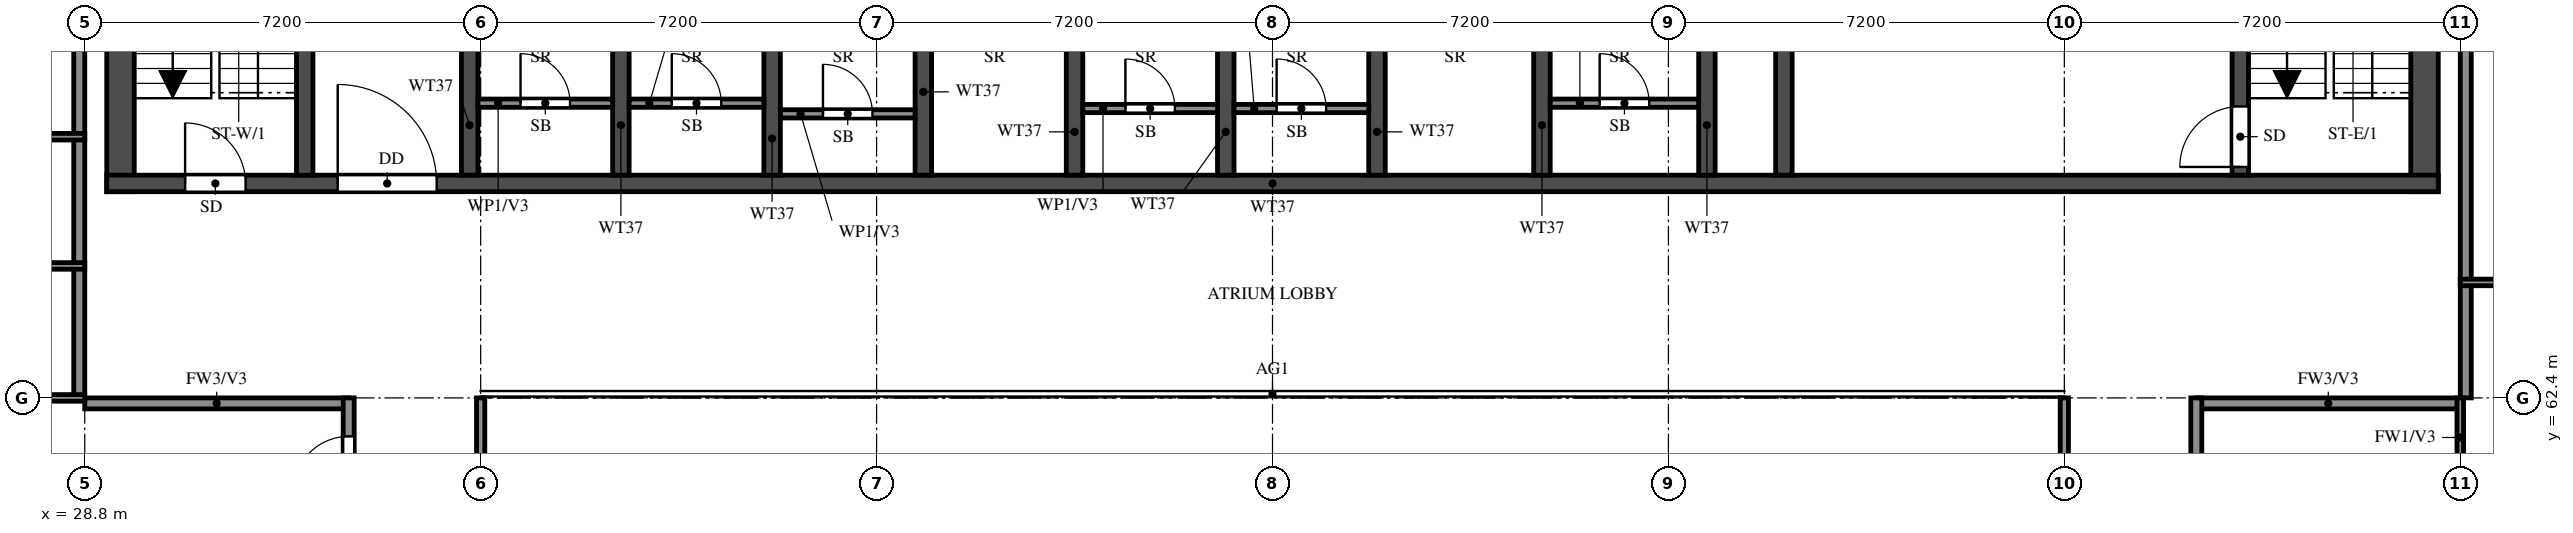
"""IFC4 building model, lengths in metres.
Left out: names, types, materials, properties, quantities, classifications, styles, units other than length and angle.
Written with IfcOpenShell. Run it as: python <this file> out.ifc"""

import sys

from ifc_helpers import new_model, si_unit, direction, frame, frame_2d, origin, place, context, subcontext, project, spatial, rectangle, extrude, element, fill, save


model = new_model("IFC4")
c1 = context("Model", 3, precision=1e-05, world=origin(), true_north=direction((0.0, 1.0)))
c2 = subcontext(c1, "Body", "Model", "MODEL_VIEW")
j1 = project(units=[si_unit("LENGTHUNIT", "METRE"), si_unit("PLANEANGLEUNIT", "RADIAN")], contexts=[c1])
p1 = place(None, origin())
s1 = spatial("IfcSite", under=j1, at=p1, CompositionType="ELEMENT")
p2 = place(p1, origin())
s2 = spatial("IfcBuilding", under=s1, at=p2, CompositionType="ELEMENT")
p3 = place(p2, frame((0.0, 0.0, 246.5)))
s3 = spatial("IfcBuildingStorey", under=s2, at=p3, CompositionType="ELEMENT", Elevation=246.5)
for number, where, z_axis, x_axis in (
    (1, (29.45, 66.15, 0.0), (0.0, 0.0, 1.0), (0.0, 1.0, 0.0)),
    (2, (71.35, 66.15, 0.0), (0.0, 0.0, 1.0), (0.0, 1.0, 0.0)),
):
    element("IfcWall", number, at=place(p3, frame(where, z_axis=z_axis, x_axis=x_axis)), inside=s3, PredefinedType="SHEAR", context=c2, shape_type="SweptSolid", body=[
        extrude(rectangle(XDim=11.85, YDim=0.5, at=frame_2d((5.925, 0.0))), origin(), (0.0, 0.0, 1.0), 3.22),
    ])
p4 = place(p3, frame((29.2, 66.3, 0.0), z_axis=(0.0, 0.0, 1.0), x_axis=(1.0, 0.0, 0.0)))
e3 = element("IfcWall", 3, at=p4, inside=s3, PredefinedType="SHEAR", context=c2, shape_type="SweptSolid", body=[
    extrude(rectangle(XDim=42.4, YDim=0.3, at=frame_2d((21.2, 0.0))), origin(), (0.0, 0.0, 1.0), 3.22),
])
p5 = place(p4, frame((1.425, 0.0, 0.0)))
e4 = element("IfcOpeningElement", 4, at=p5, cuts=e3, PredefinedType="OPENING", context=c2, shape_type="SweptSolid", body=[
    extrude(rectangle(XDim=1.1, YDim=2.1, at=frame_2d((0.55, 1.05))), frame((0.0, 0.16, 0.0), z_axis=(0.0, -1.0, 0.0), x_axis=(1.0, 0.0, 0.0)), (0.0, 0.0, 1.0), 0.32),
])
p6 = place(p4, frame((4.2, 0.0, 0.0)))
e5 = element("IfcOpeningElement", 5, at=p6, cuts=e3, PredefinedType="OPENING", context=c2, shape_type="SweptSolid", body=[
    extrude(rectangle(XDim=1.8, YDim=2.1, at=frame_2d((0.9, 1.05))), frame((0.0, 0.16, 0.0), z_axis=(0.0, -1.0, 0.0), x_axis=(1.0, 0.0, 0.0)), (0.0, 0.0, 1.0), 0.32),
])
p7 = place(p3, frame((32.8, 66.45, 0.0), z_axis=(0.0, 0.0, 1.0), x_axis=(0.0, 1.0, 0.0)))
e6 = element("IfcWall", 6, at=p7, inside=s3, PredefinedType="SHEAR", context=c2, shape_type="SweptSolid", body=[
    extrude(rectangle(XDim=11.05, YDim=0.3, at=frame_2d((5.525, 0.0))), origin(), (0.0, 0.0, 1.0), 3.22),
])
p8 = place(p3, frame((68.0, 66.45, 0.0), z_axis=(0.0, 0.0, 1.0), x_axis=(0.0, 1.0, 0.0)))
e7 = element("IfcWall", 7, at=p8, inside=s3, PredefinedType="SHEAR", context=c2, shape_type="SweptSolid", body=[
    extrude(rectangle(XDim=11.05, YDim=0.3, at=frame_2d((5.525, 0.0))), origin(), (0.0, 0.0, 1.0), 3.22),
])
p9 = place(p8, frame((0.15, 0.0, 0.0)))
e8 = element("IfcOpeningElement", 8, at=p9, cuts=e7, PredefinedType="OPENING", context=c2, shape_type="SweptSolid", body=[
    extrude(rectangle(XDim=1.1, YDim=2.1, at=frame_2d((0.55, 1.05))), frame((0.0, 0.16, 0.0), z_axis=(0.0, -1.0, 0.0), x_axis=(1.0, 0.0, 0.0)), (0.0, 0.0, 1.0), 0.32),
])
p10 = place(p3, frame((59.7, 66.45, 0.0), z_axis=(0.0, 0.0, 1.0), x_axis=(0.0, 1.0, 0.0)))
e9 = element("IfcWall", 9, at=p10, inside=s3, PredefinedType="SHEAR", context=c2, shape_type="SweptSolid", body=[
    extrude(rectangle(XDim=6.175, YDim=0.3, at=frame_2d((3.087, 0.0))), origin(), (0.0, 0.0, 1.0), 3.22),
])
p11 = place(p10, frame((3.85, 0.0, 0.0)))
e10 = element("IfcOpeningElement", 10, at=p11, cuts=e9, PredefinedType="OPENING", context=c2, shape_type="SweptSolid", body=[
    extrude(rectangle(XDim=1.2, YDim=2.1, at=frame_2d((0.6, 1.05))), frame((0.0, 0.16, 0.0), z_axis=(0.0, -1.0, 0.0), x_axis=(1.0, 0.0, 0.0)), (0.0, 0.0, 1.0), 0.32),
])
for number, where, z_axis, x_axis in (
    (11, (35.8, 66.45, 0.0), (0.0, 0.0, 1.0), (0.0, 1.0, 0.0)),
    (12, (38.55, 66.45, 0.0), (0.0, 0.0, 1.0), (0.0, 1.0, 0.0)),
    (13, (41.3, 66.45, 0.0), (0.0, 0.0, 1.0), (0.0, 1.0, 0.0)),
    (14, (44.05, 66.45, 0.0), (0.0, 0.0, 1.0), (0.0, 1.0, 0.0)),
    (15, (46.8, 66.45, 0.0), (0.0, 0.0, 1.0), (0.0, 1.0, 0.0)),
    (16, (49.55, 66.45, 0.0), (0.0, 0.0, 1.0), (0.0, 1.0, 0.0)),
    (17, (52.3, 66.45, 0.0), (0.0, 0.0, 1.0), (0.0, 1.0, 0.0)),
    (18, (55.3, 66.45, 0.0), (0.0, 0.0, 1.0), (0.0, 1.0, 0.0)),
    (19, (58.3, 66.45, 0.0), (0.0, 0.0, 1.0), (0.0, 1.0, 0.0)),
):
    element("IfcWall", number, at=place(p3, frame(where, z_axis=z_axis, x_axis=x_axis)), inside=s3, PredefinedType="SHEAR", context=c2, shape_type="SweptSolid", body=[
        extrude(rectangle(XDim=2.425, YDim=0.3, at=frame_2d((1.212, 0.0))), origin(), (0.0, 0.0, 1.0), 3.22),
    ])
p12 = place(p3, frame((35.95, 67.76, 0.0), z_axis=(0.0, 0.0, 1.0), x_axis=(1.0, 0.0, 0.0)))
e20 = element("IfcWall", 20, at=p12, inside=s3, PredefinedType="PARTITIONING", context=c2, shape_type="SweptSolid", body=[
    extrude(rectangle(XDim=2.45, YDim=0.15, at=frame_2d((1.225, 0.0))), origin(), (0.0, 0.0, 1.0), 3.22),
])
p13 = place(p12, frame((0.775, 0.0, 0.0)))
e21 = element("IfcOpeningElement", 21, at=p13, cuts=e20, PredefinedType="OPENING", context=c2, shape_type="SweptSolid", body=[
    extrude(rectangle(XDim=0.9, YDim=2.1, at=frame_2d((0.45, 1.05))), frame((0.0, 0.085, 0.0), z_axis=(0.0, -1.0, 0.0), x_axis=(1.0, 0.0, 0.0)), (0.0, 0.0, 1.0), 0.17),
])
p14 = place(p3, frame((38.7, 67.76, 0.0), z_axis=(0.0, 0.0, 1.0), x_axis=(1.0, 0.0, 0.0)))
e22 = element("IfcWall", 22, at=p14, inside=s3, PredefinedType="PARTITIONING", context=c2, shape_type="SweptSolid", body=[
    extrude(rectangle(XDim=2.45, YDim=0.15, at=frame_2d((1.225, 0.0))), origin(), (0.0, 0.0, 1.0), 3.22),
])
p15 = place(p14, frame((0.775, 0.0, 0.0)))
e23 = element("IfcOpeningElement", 23, at=p15, cuts=e22, PredefinedType="OPENING", context=c2, shape_type="SweptSolid", body=[
    extrude(rectangle(XDim=0.9, YDim=2.1, at=frame_2d((0.45, 1.05))), frame((0.0, 0.085, 0.0), z_axis=(0.0, -1.0, 0.0), x_axis=(1.0, 0.0, 0.0)), (0.0, 0.0, 1.0), 0.17),
])
p16 = place(p3, frame((41.45, 67.565, 0.0), z_axis=(0.0, 0.0, 1.0), x_axis=(1.0, 0.0, 0.0)))
e24 = element("IfcWall", 24, at=p16, inside=s3, PredefinedType="PARTITIONING", context=c2, shape_type="SweptSolid", body=[
    extrude(rectangle(XDim=2.45, YDim=0.15, at=frame_2d((1.225, 0.0))), origin(), (0.0, 0.0, 1.0), 3.22),
])
p17 = place(p16, frame((0.775, 0.0, 0.0)))
e25 = element("IfcOpeningElement", 25, at=p17, cuts=e24, PredefinedType="OPENING", context=c2, shape_type="SweptSolid", body=[
    extrude(rectangle(XDim=0.9, YDim=2.1, at=frame_2d((0.45, 1.05))), frame((0.0, 0.085, 0.0), z_axis=(0.0, -1.0, 0.0), x_axis=(1.0, 0.0, 0.0)), (0.0, 0.0, 1.0), 0.17),
])
p18 = place(p3, frame((46.95, 67.663, 0.0), z_axis=(0.0, 0.0, 1.0), x_axis=(1.0, 0.0, 0.0)))
e26 = element("IfcWall", 26, at=p18, inside=s3, PredefinedType="PARTITIONING", context=c2, shape_type="SweptSolid", body=[
    extrude(rectangle(XDim=2.45, YDim=0.15, at=frame_2d((1.225, 0.0))), origin(), (0.0, 0.0, 1.0), 3.22),
])
p19 = place(p18, frame((0.775, 0.0, 0.0)))
e27 = element("IfcOpeningElement", 27, at=p19, cuts=e26, PredefinedType="OPENING", context=c2, shape_type="SweptSolid", body=[
    extrude(rectangle(XDim=0.9, YDim=2.1, at=frame_2d((0.45, 1.05))), frame((0.0, 0.085, 0.0), z_axis=(0.0, -1.0, 0.0), x_axis=(1.0, 0.0, 0.0)), (0.0, 0.0, 1.0), 0.17),
])
p20 = place(p3, frame((49.7, 67.663, 0.0), z_axis=(0.0, 0.0, 1.0), x_axis=(1.0, 0.0, 0.0)))
e28 = element("IfcWall", 28, at=p20, inside=s3, PredefinedType="PARTITIONING", context=c2, shape_type="SweptSolid", body=[
    extrude(rectangle(XDim=2.45, YDim=0.15, at=frame_2d((1.225, 0.0))), origin(), (0.0, 0.0, 1.0), 3.22),
])
p21 = place(p20, frame((0.775, 0.0, 0.0)))
e29 = element("IfcOpeningElement", 29, at=p21, cuts=e28, PredefinedType="OPENING", context=c2, shape_type="SweptSolid", body=[
    extrude(rectangle(XDim=0.9, YDim=2.1, at=frame_2d((0.45, 1.05))), frame((0.0, 0.085, 0.0), z_axis=(0.0, -1.0, 0.0), x_axis=(1.0, 0.0, 0.0)), (0.0, 0.0, 1.0), 0.17),
])
p22 = place(p3, frame((55.45, 67.76, 0.0), z_axis=(0.0, 0.0, 1.0), x_axis=(1.0, 0.0, 0.0)))
e30 = element("IfcWall", 30, at=p22, inside=s3, PredefinedType="PARTITIONING", context=c2, shape_type="SweptSolid", body=[
    extrude(rectangle(XDim=2.7, YDim=0.15, at=frame_2d((1.35, 0.0))), origin(), (0.0, 0.0, 1.0), 3.22),
])
p23 = place(p22, frame((0.9, 0.0, 0.0)))
e31 = element("IfcOpeningElement", 31, at=p23, cuts=e30, PredefinedType="OPENING", context=c2, shape_type="SweptSolid", body=[
    extrude(rectangle(XDim=0.9, YDim=2.1, at=frame_2d((0.45, 1.05))), frame((0.0, 0.085, 0.0), z_axis=(0.0, -1.0, 0.0), x_axis=(1.0, 0.0, 0.0)), (0.0, 0.0, 1.0), 0.17),
])
for number, where, z_axis, x_axis in (
    (32, (28.8, 62.3, 0.0), (0.0, 0.0, 1.0), (1.0, 0.0, 0.0)),
    (33, (67.2, 62.3, 0.0), (0.0, 0.0, 1.0), (1.0, 0.0, 0.0)),
):
    element("IfcWall", number, at=place(p3, frame(where, z_axis=z_axis, x_axis=x_axis)), inside=s3, PredefinedType="SOLIDWALL", context=c2, shape_type="SweptSolid", body=[
        extrude(rectangle(XDim=4.8, YDim=0.2, at=frame_2d((2.4, 0.0))), origin(), (0.0, 0.0, 1.0), 3.22),
    ])
p24 = place(p3, frame((28.7, 62.4, 0.0), z_axis=(0.0, 0.0, 1.0), x_axis=(0.0, 1.0, 0.0)))
e34 = element("IfcWall", 34, at=p24, inside=s3, PredefinedType="SOLIDWALL", context=c2, shape_type="SweptSolid", body=[
    extrude(rectangle(XDim=15.6, YDim=0.2, at=frame_2d((7.8, 0.0))), origin(), (0.0, 0.0, 1.0), 3.22),
])
p25 = place(p3, frame((33.6, 45.6, 0.0), z_axis=(0.0, 0.0, 1.0), x_axis=(0.0, 1.0, 0.0)))
e35 = element("IfcWall", 35, at=p25, inside=s3, PredefinedType="SOLIDWALL", context=c2, shape_type="SweptSolid", body=[
    extrude(rectangle(XDim=16.8, YDim=0.2, at=frame_2d((8.4, 0.0))), origin(), (0.0, 0.0, 1.0), 3.22),
])
p26 = place(p25, frame((0.7, 0.0, 0.0)))
e36 = element("IfcOpeningElement", 36, at=p26, cuts=e35, PredefinedType="OPENING", context=c2, shape_type="SweptSolid", body=[
    extrude(rectangle(XDim=1.0, YDim=2.1, at=frame_2d((0.5, 1.05))), frame((0.0, 0.11, 0.0), z_axis=(0.0, -1.0, 0.0), x_axis=(1.0, 0.0, 0.0)), (0.0, 0.0, 1.0), 0.22),
])
p27 = place(p25, frame((8.3, 0.0, 0.0)))
e37 = element("IfcOpeningElement", 37, at=p27, cuts=e35, PredefinedType="OPENING", context=c2, shape_type="SweptSolid", body=[
    extrude(rectangle(XDim=1.0, YDim=2.1, at=frame_2d((0.5, 1.05))), frame((0.0, 0.11, 0.0), z_axis=(0.0, -1.0, 0.0), x_axis=(1.0, 0.0, 0.0)), (0.0, 0.0, 1.0), 0.22),
])
p28 = place(p25, frame((15.1, 0.0, 0.0)))
e38 = element("IfcOpeningElement", 38, at=p28, cuts=e35, PredefinedType="OPENING", context=c2, shape_type="SweptSolid", body=[
    extrude(rectangle(XDim=1.0, YDim=2.1, at=frame_2d((0.5, 1.05))), frame((0.0, 0.11, 0.0), z_axis=(0.0, -1.0, 0.0), x_axis=(1.0, 0.0, 0.0)), (0.0, 0.0, 1.0), 0.22),
])
p29 = place(p3, frame((67.2, 56.4, 0.0), z_axis=(0.0, 0.0, 1.0), x_axis=(0.0, 1.0, 0.0)))
e39 = element("IfcWall", 39, at=p29, inside=s3, PredefinedType="SOLIDWALL", context=c2, shape_type="SweptSolid", body=[
    extrude(rectangle(XDim=6.0, YDim=0.2, at=frame_2d((3.0, 0.0))), origin(), (0.0, 0.0, 1.0), 3.22),
])
p30 = place(p29, frame((3.7, 0.0, 0.0)))
e40 = element("IfcOpeningElement", 40, at=p30, cuts=e39, PredefinedType="OPENING", context=c2, shape_type="SweptSolid", body=[
    extrude(rectangle(XDim=1.0, YDim=2.1, at=frame_2d((0.5, 1.05))), frame((0.0, 0.11, 0.0), z_axis=(0.0, -1.0, 0.0), x_axis=(1.0, 0.0, 0.0)), (0.0, 0.0, 1.0), 0.22),
])
p31 = place(p3, frame((72.1, 62.4, 0.0), z_axis=(0.0, 0.0, 1.0), x_axis=(0.0, 1.0, 0.0)))
e41 = element("IfcWall", 41, at=p31, inside=s3, PredefinedType="SOLIDWALL", context=c2, shape_type="SweptSolid", body=[
    extrude(rectangle(XDim=15.6, YDim=0.2, at=frame_2d((7.8, 0.0))), origin(), (0.0, 0.0, 1.0), 3.22),
])
p32 = place(p3, frame((26.4, 62.4, 0.0), z_axis=(0.0, 0.0, 1.0), x_axis=(1.0, 0.0, 0.0)))
e42 = element("IfcWall", 42, at=p32, inside=s3, PredefinedType="PARTITIONING", context=c2, shape_type="SweptSolid", body=[
    extrude(rectangle(XDim=2.4, YDim=0.12, at=frame_2d((1.2, 0.0))), origin(), (0.0, 0.0, 1.0), 3.22),
])
p33 = place(p32, frame((0.75, 0.0, 0.0)))
e43 = element("IfcOpeningElement", 43, at=p33, cuts=e42, PredefinedType="OPENING", context=c2, shape_type="SweptSolid", body=[
    extrude(rectangle(XDim=0.9, YDim=2.1, at=frame_2d((0.45, 1.05))), frame((0.0, 0.07, 0.0), z_axis=(0.0, -1.0, 0.0), x_axis=(1.0, 0.0, 0.0)), (0.0, 0.0, 1.0), 0.14),
])
p34 = place(p3, frame((72.0, 64.5, 0.0), z_axis=(0.0, 0.0, 1.0), x_axis=(1.0, 0.0, 0.0)))
e44 = element("IfcWall", 44, at=p34, inside=s3, PredefinedType="PARTITIONING", context=c2, shape_type="SweptSolid", body=[
    extrude(rectangle(XDim=3.5, YDim=0.12, at=frame_2d((1.75, 0.0))), origin(), (0.0, 0.0, 1.0), 3.22),
])
p35 = place(p3, frame((25.3, 64.8, 0.0), z_axis=(0.0, 0.0, 1.0), x_axis=(1.0, 0.0, 0.0)))
e45 = element("IfcWall", 45, at=p35, inside=s3, PredefinedType="PARTITIONING", context=c2, shape_type="SweptSolid", body=[
    extrude(rectangle(XDim=3.5, YDim=0.12, at=frame_2d((1.75, 0.0))), origin(), (0.0, 0.0, 1.0), 3.22),
])
p36 = place(p35, frame((1.3, 0.0, 0.0)))
e46 = element("IfcOpeningElement", 46, at=p36, cuts=e45, PredefinedType="OPENING", context=c2, shape_type="SweptSolid", body=[
    extrude(rectangle(XDim=0.9, YDim=2.1, at=frame_2d((0.45, 1.05))), frame((0.0, 0.07, 0.0), z_axis=(0.0, -1.0, 0.0), x_axis=(1.0, 0.0, 0.0)), (0.0, 0.0, 1.0), 0.14),
])
p37 = place(p3, frame((25.3, 67.15, 0.0), z_axis=(0.0, 0.0, 1.0), x_axis=(1.0, 0.0, 0.0)))
e47 = element("IfcWall", 47, at=p37, inside=s3, PredefinedType="PARTITIONING", context=c2, shape_type="SweptSolid", body=[
    extrude(rectangle(XDim=3.5, YDim=0.12, at=frame_2d((1.75, 0.0))), origin(), (0.0, 0.0, 1.0), 3.22),
])
p38 = place(p3, frame((72.0, 58.8, 0.0), z_axis=(0.0, 0.0, 1.0), x_axis=(0.0, 1.0, 0.0)))
e48 = element("IfcWall", 48, at=p38, inside=s3, PredefinedType="PARTITIONING", context=c2, shape_type="SweptSolid", body=[
    extrude(rectangle(XDim=3.6, YDim=0.12, at=frame_2d((1.8, 0.0))), origin(), (0.0, 0.0, 1.0), 3.22),
])
p39 = place(p38, frame((0.75, 0.0, 0.0)))
e49 = element("IfcOpeningElement", 49, at=p39, cuts=e48, PredefinedType="OPENING", context=c2, shape_type="SweptSolid", body=[
    extrude(rectangle(XDim=0.9, YDim=2.1, at=frame_2d((0.45, 1.05))), frame((0.0, 0.07, 0.0), z_axis=(0.0, -1.0, 0.0), x_axis=(1.0, 0.0, 0.0)), (0.0, 0.0, 1.0), 0.14),
])
for number, where, z_axis, x_axis in (
    (50, (36.0, 48.0, 0.0), (0.0, 0.0, 1.0), (0.0, 1.0, 0.0)),
    (51, (64.8, 48.0, 0.0), (0.0, 0.0, 1.0), (0.0, 1.0, 0.0)),
):
    element("IfcWall", number, at=place(p3, frame(where, z_axis=z_axis, x_axis=x_axis)), inside=s3, PredefinedType="SOLIDWALL", context=c2, shape_type="SweptSolid", body=[
        extrude(rectangle(XDim=14.4, YDim=0.15, at=frame_2d((7.2, 0.0))), origin(), (0.0, 0.0, 1.0), 2.32),
    ])
p40 = place(p5, origin())
e52 = element("IfcDoor", 52, at=p40, inside=s3, OperationType="SINGLE_SWING_LEFT", PredefinedType="DOOR", context=c2, shape_type="SweptSolid", body=[
    extrude(rectangle(XDim=1.1, YDim=2.1, at=frame_2d((0.55, 1.05))), frame((0.0, 0.025, 0.0), z_axis=(0.0, -1.0, 0.0), x_axis=(1.0, 0.0, 0.0)), (0.0, 0.0, 1.0), 0.05),
])
fill(e4, e52)
p41 = place(p9, origin())
e53 = element("IfcDoor", 53, at=p41, inside=s3, OperationType="SINGLE_SWING_RIGHT", PredefinedType="DOOR", context=c2, shape_type="SweptSolid", body=[
    extrude(rectangle(XDim=1.1, YDim=2.1, at=frame_2d((0.55, 1.05))), frame((0.0, 0.025, 0.0), z_axis=(0.0, -1.0, 0.0), x_axis=(1.0, 0.0, 0.0)), (0.0, 0.0, 1.0), 0.05),
])
fill(e8, e53)
p42 = place(p6, origin())
e54 = element("IfcDoor", 54, at=p42, inside=s3, OperationType="DOUBLE_DOOR_SINGLE_SWING", PredefinedType="DOOR", context=c2, shape_type="SweptSolid", body=[
    extrude(rectangle(XDim=1.8, YDim=2.1, at=frame_2d((0.9, 1.05))), frame((0.0, 0.025, 0.0), z_axis=(0.0, -1.0, 0.0), x_axis=(1.0, 0.0, 0.0)), (0.0, 0.0, 1.0), 0.05),
])
fill(e5, e54)
p43 = place(p13, origin())
e55 = element("IfcDoor", 55, at=p43, inside=s3, OperationType="SINGLE_SWING_LEFT", PredefinedType="DOOR", context=c2, shape_type="SweptSolid", body=[
    extrude(rectangle(XDim=0.9, YDim=2.1, at=frame_2d((0.45, 1.05))), frame((0.0, 0.025, 0.0), z_axis=(0.0, -1.0, 0.0), x_axis=(1.0, 0.0, 0.0)), (0.0, 0.0, 1.0), 0.05),
])
fill(e21, e55)
p44 = place(p15, origin())
e56 = element("IfcDoor", 56, at=p44, inside=s3, OperationType="SINGLE_SWING_RIGHT", PredefinedType="DOOR", context=c2, shape_type="SweptSolid", body=[
    extrude(rectangle(XDim=0.9, YDim=2.1, at=frame_2d((0.45, 1.05))), frame((0.0, 0.025, 0.0), z_axis=(0.0, -1.0, 0.0), x_axis=(1.0, 0.0, 0.0)), (0.0, 0.0, 1.0), 0.05),
])
fill(e23, e56)
p45 = place(p17, origin())
e57 = element("IfcDoor", 57, at=p45, inside=s3, OperationType="SINGLE_SWING_RIGHT", PredefinedType="DOOR", context=c2, shape_type="SweptSolid", body=[
    extrude(rectangle(XDim=0.9, YDim=2.1, at=frame_2d((0.45, 1.05))), frame((0.0, 0.025, 0.0), z_axis=(0.0, -1.0, 0.0), x_axis=(1.0, 0.0, 0.0)), (0.0, 0.0, 1.0), 0.05),
])
fill(e25, e57)
p46 = place(p19, origin())
e58 = element("IfcDoor", 58, at=p46, inside=s3, OperationType="SINGLE_SWING_RIGHT", PredefinedType="DOOR", context=c2, shape_type="SweptSolid", body=[
    extrude(rectangle(XDim=0.9, YDim=2.1, at=frame_2d((0.45, 1.05))), frame((0.0, 0.025, 0.0), z_axis=(0.0, -1.0, 0.0), x_axis=(1.0, 0.0, 0.0)), (0.0, 0.0, 1.0), 0.05),
])
fill(e27, e58)
p47 = place(p21, origin())
e59 = element("IfcDoor", 59, at=p47, inside=s3, OperationType="SINGLE_SWING_LEFT", PredefinedType="DOOR", context=c2, shape_type="SweptSolid", body=[
    extrude(rectangle(XDim=0.9, YDim=2.1, at=frame_2d((0.45, 1.05))), frame((0.0, 0.025, 0.0), z_axis=(0.0, -1.0, 0.0), x_axis=(1.0, 0.0, 0.0)), (0.0, 0.0, 1.0), 0.05),
])
fill(e29, e59)
p48 = place(p23, origin())
e60 = element("IfcDoor", 60, at=p48, inside=s3, OperationType="SINGLE_SWING_LEFT", PredefinedType="DOOR", context=c2, shape_type="SweptSolid", body=[
    extrude(rectangle(XDim=0.9, YDim=2.1, at=frame_2d((0.45, 1.05))), frame((0.0, 0.025, 0.0), z_axis=(0.0, -1.0, 0.0), x_axis=(1.0, 0.0, 0.0)), (0.0, 0.0, 1.0), 0.05),
])
fill(e31, e60)
p49 = place(p28, origin())
e61 = element("IfcDoor", 61, at=p49, inside=s3, OperationType="SINGLE_SWING_LEFT", PredefinedType="DOOR", context=c2, shape_type="SweptSolid", body=[
    extrude(rectangle(XDim=1.0, YDim=2.1, at=frame_2d((0.5, 1.05))), frame((0.0, 0.025, 0.0), z_axis=(0.0, -1.0, 0.0), x_axis=(1.0, 0.0, 0.0)), (0.0, 0.0, 1.0), 0.05),
])
fill(e38, e61)
save(model, sys.argv[1])
